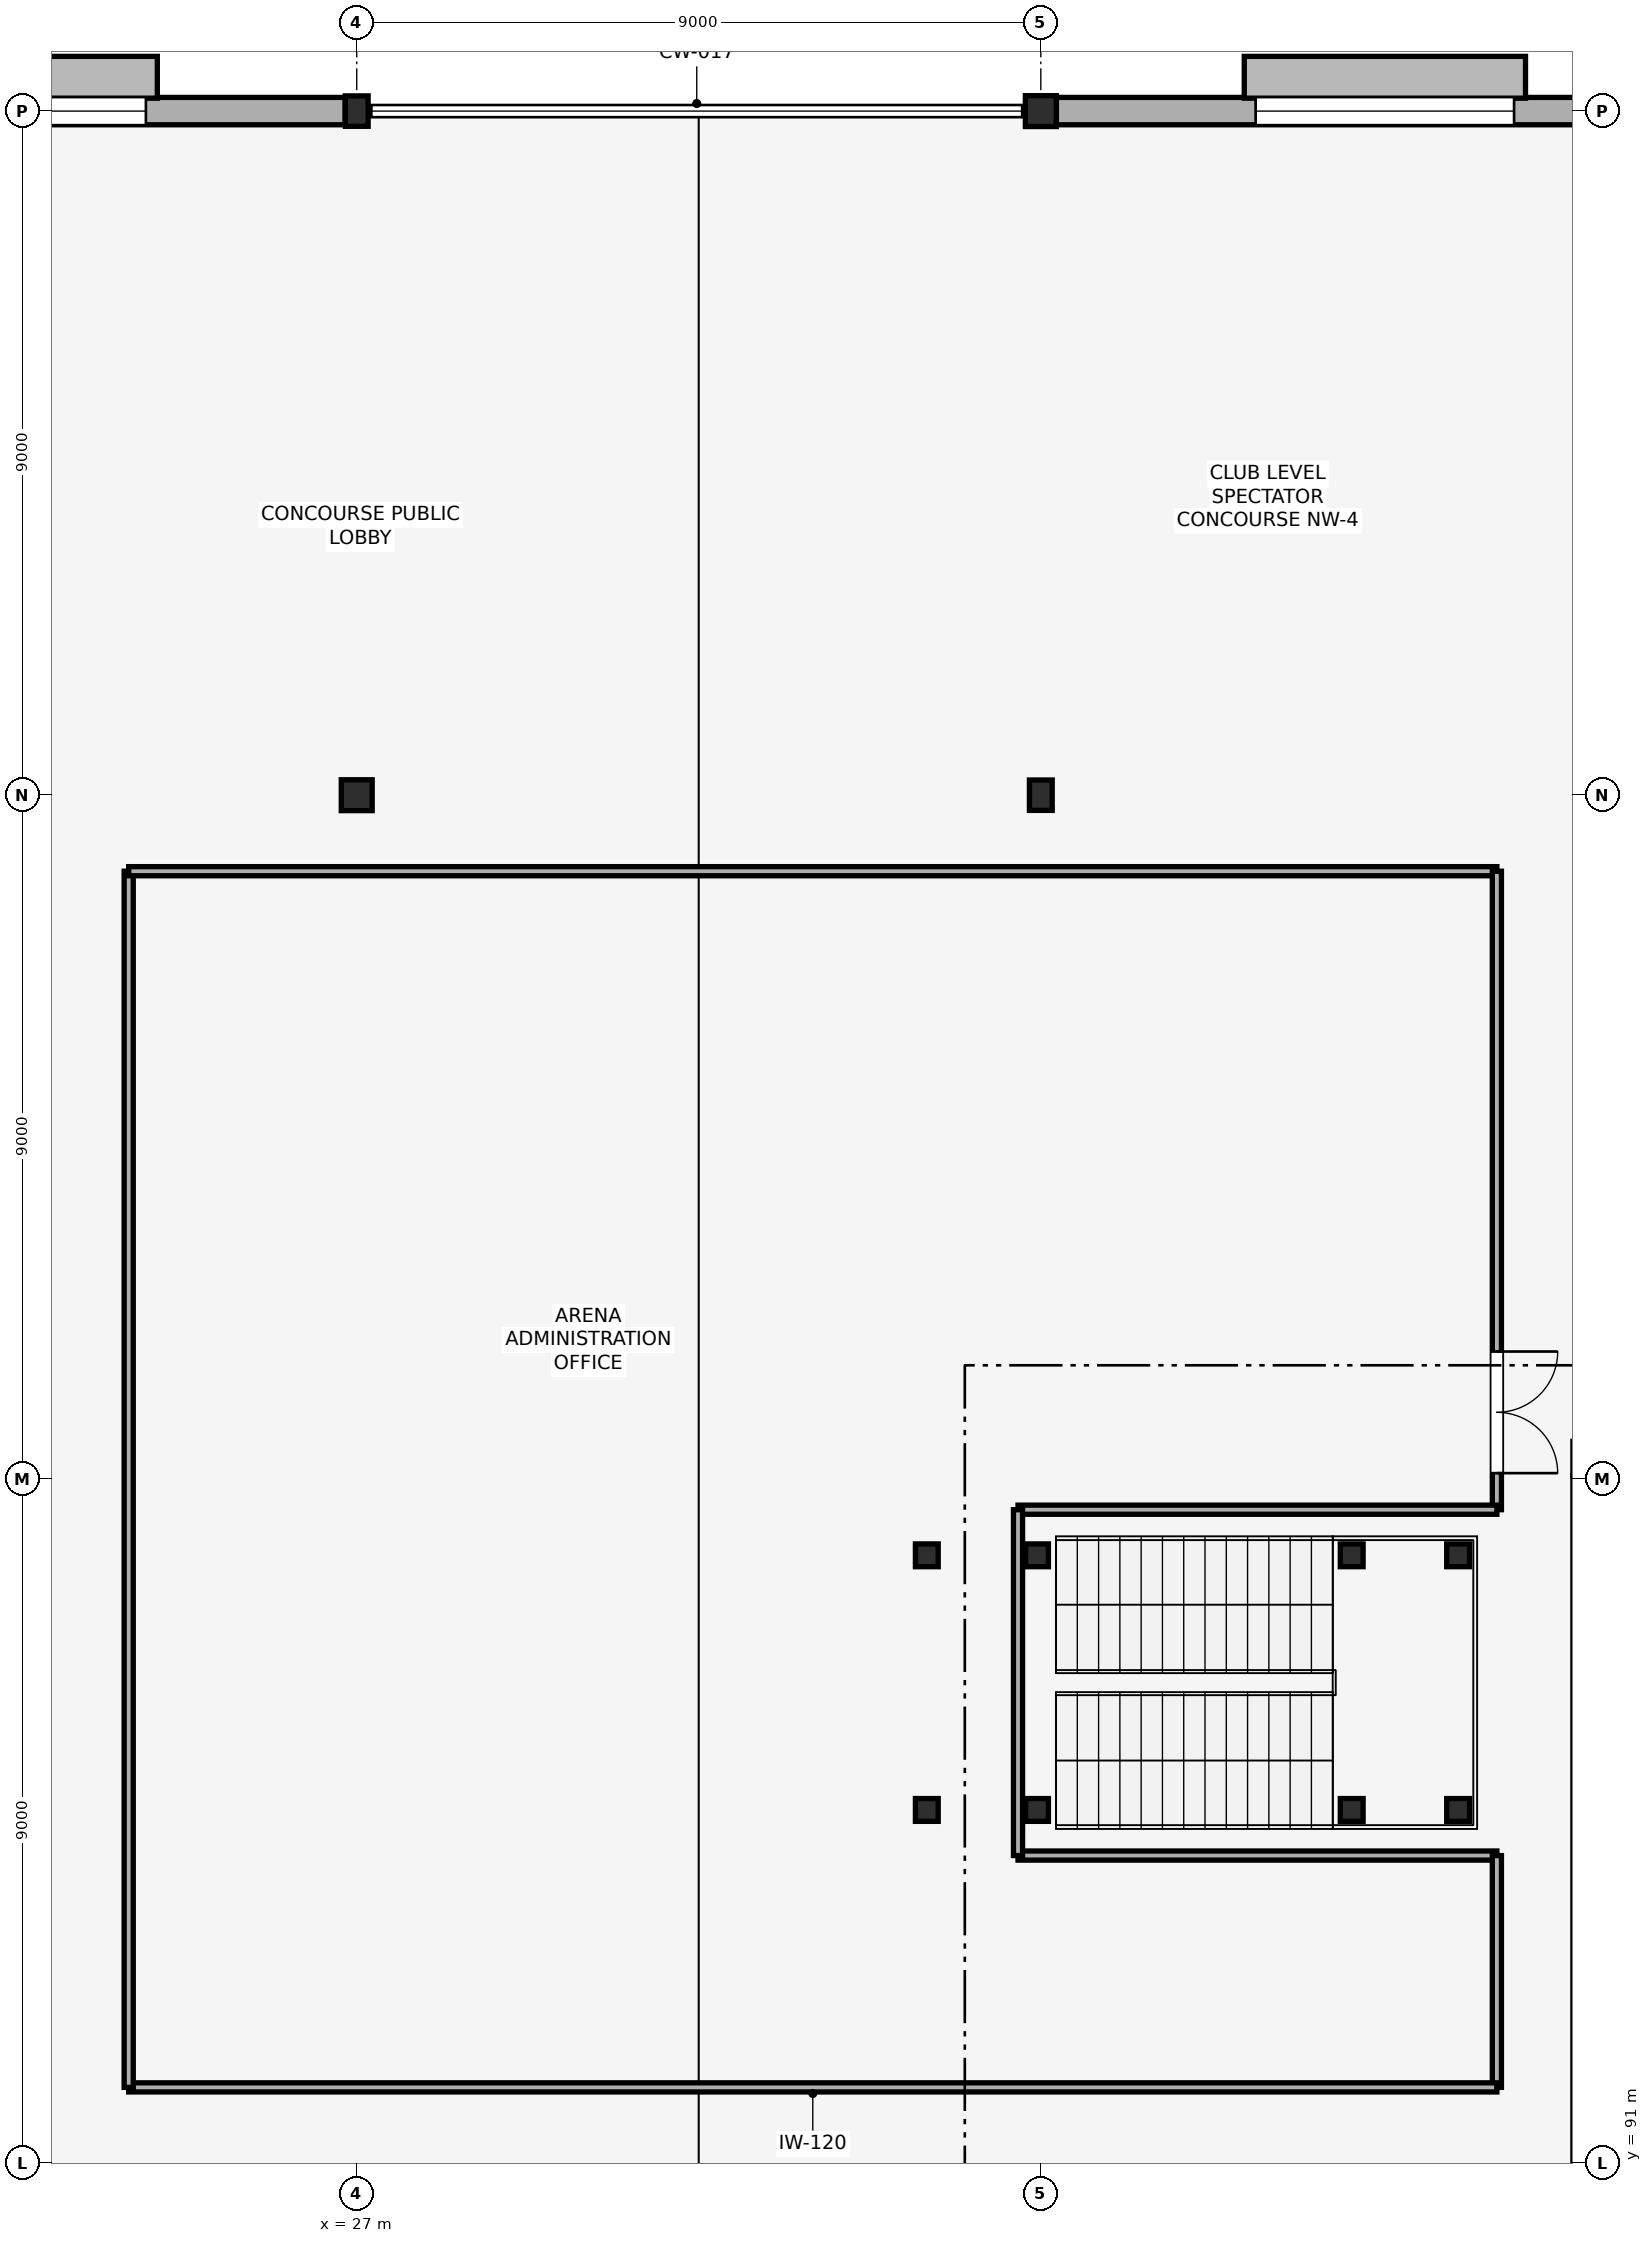
"""IFC4 building model, lengths in metres.
Left out: names, types, materials, properties, quantities, classifications, styles, units other than length and angle.
Written with IfcOpenShell. Run it as: python <this file> out.ifc"""

import sys

from ifc_helpers import new_model, si_unit, direction, frame, frame_2d, origin, origin_2d, place, context, subcontext, project, spatial, rectangle, hollow_rectangle, hollow_circle, i_section, extrude, element, fill, save


model = new_model("IFC4")
c1 = context("Model", 3, precision=1e-05, world=origin(), true_north=direction((0.0, 1.0)))
c2 = subcontext(c1, "Body", "Model", "MODEL_VIEW")
j1 = project(units=[si_unit("LENGTHUNIT", "METRE"), si_unit("PLANEANGLEUNIT", "RADIAN")], contexts=[c1])
p1 = place(None, origin())
s1 = spatial("IfcSite", under=j1, at=p1, CompositionType="ELEMENT")
p2 = place(p1, origin())
s2 = spatial("IfcBuilding", under=s1, at=p2, CompositionType="ELEMENT")
p3 = place(p2, frame((0.0, 0.0, 10.2)))
s3 = spatial("IfcBuildingStorey", under=s2, at=p3, CompositionType="ELEMENT", Elevation=10.2)
p4 = place(p3, frame((27.0, 109.0, 0.0), z_axis=(0.0, 0.0, 1.0), x_axis=(1.0, 0.0, 0.0)))
e1 = element("IfcColumn", 1, at=p4, inside=s3, PredefinedType="COLUMN", context=c2, shape_type="SweptSolid", body=[
    extrude(hollow_circle(Radius=0.203, WallThickness=0.016, at=origin_2d()), origin(), (0.0, 0.0, 1.0), 4.8),
])
for number, where, z_axis, x_axis in (
    (2, (27.0, 118.0, 0.0), (0.0, 0.0, 1.0), (1.0, 0.0, 0.0)),
    (3, (36.0, 109.0, 0.0), (0.0, 0.0, 1.0), (1.0, 0.0, 0.0)),
):
    element("IfcColumn", number, at=place(p3, frame(where, z_axis=z_axis, x_axis=x_axis)), inside=s3, PredefinedType="COLUMN", context=c2, shape_type="SweptSolid", body=[
        extrude(i_section(OverallWidth=0.3, OverallDepth=0.4, WebThickness=0.013, FlangeThickness=0.024, FilletRadius=0.027, at=origin_2d()), origin(), (0.0, 0.0, 1.0), 4.8),
    ])
p5 = place(p3, frame((36.0, 118.0, 0.0), z_axis=(0.0, 0.0, 1.0), x_axis=(1.0, 0.0, 0.0)))
e4 = element("IfcColumn", 4, at=p5, inside=s3, PredefinedType="COLUMN", context=c2, shape_type="SweptSolid", body=[
    extrude(hollow_circle(Radius=0.203, WallThickness=0.016, at=origin_2d()), origin(), (0.0, 0.0, 1.0), 4.8),
])
p6 = place(p3, frame((18.205, 118.0, 0.0), z_axis=(0.0, 0.0, 1.0), x_axis=(1.0, 0.0, 0.0)))
e5 = element("IfcWall", 5, at=p6, inside=s3, PredefinedType="STANDARD", context=c2, shape_type="SweptSolid", body=[
    extrude(rectangle(XDim=8.643, YDim=0.36, at=frame_2d((4.321, 0.0))), origin(), (0.0, 0.0, 1.0), 3.907),
])
p7 = place(p6, frame((2.621, 0.0, 0.9)))
e6 = element("IfcOpeningElement", 6, at=p7, cuts=e5, PredefinedType="OPENING", context=c2, shape_type="SweptSolid", body=[
    extrude(rectangle(XDim=3.4, YDim=2.0, at=frame_2d((1.7, 1.0))), frame((0.0, 0.19, 0.0), z_axis=(0.0, -1.0, 0.0), x_axis=(1.0, 0.0, 0.0)), (0.0, 0.0, 1.0), 0.38),
])
p8 = place(p3, frame((36.205, 118.0, 0.0), z_axis=(0.0, 0.0, 1.0), x_axis=(1.0, 0.0, 0.0)))
e7 = element("IfcWall", 7, at=p8, inside=s3, PredefinedType="STANDARD", context=c2, shape_type="SweptSolid", body=[
    extrude(rectangle(XDim=8.643, YDim=0.36, at=frame_2d((4.321, 0.0))), origin(), (0.0, 0.0, 1.0), 3.907),
])
p9 = place(p8, frame((2.621, 0.0, 0.9)))
e8 = element("IfcOpeningElement", 8, at=p9, cuts=e7, PredefinedType="OPENING", context=c2, shape_type="SweptSolid", body=[
    extrude(rectangle(XDim=3.4, YDim=2.0, at=frame_2d((1.7, 1.0))), frame((0.0, 0.19, 0.0), z_axis=(0.0, -1.0, 0.0), x_axis=(1.0, 0.0, 0.0)), (0.0, 0.0, 1.0), 0.38),
])
for number, where, z_axis, x_axis in (
    (9, (34.5, 95.65, 0.0), (0.0, 0.0, 1.0), (1.0, 0.0, 0.0)),
    (10, (34.5, 99.0, 0.0), (0.0, 0.0, 1.0), (1.0, 0.0, 0.0)),
    (11, (35.95, 95.65, 0.0), (0.0, 0.0, 1.0), (1.0, 0.0, 0.0)),
    (12, (35.95, 99.0, 0.0), (0.0, 0.0, 1.0), (1.0, 0.0, 0.0)),
):
    element("IfcColumn", number, at=place(p3, frame(where, z_axis=z_axis, x_axis=x_axis)), inside=s3, PredefinedType="COLUMN", context=c2, shape_type="SweptSolid", body=[
        extrude(hollow_rectangle(XDim=0.3, YDim=0.3, WallThickness=0.012, at=origin_2d()), origin(), (0.0, 0.0, 1.0), 4.52),
    ])
for number, where, z_axis, x_axis in (
    (13, (40.09, 95.65, 0.0), (0.0, 0.0, 1.0), (1.0, 0.0, 0.0)),
    (14, (40.09, 99.0, 0.0), (0.0, 0.0, 1.0), (1.0, 0.0, 0.0)),
    (15, (41.49, 95.65, 0.0), (0.0, 0.0, 1.0), (1.0, 0.0, 0.0)),
    (16, (41.49, 99.0, 0.0), (0.0, 0.0, 1.0), (1.0, 0.0, 0.0)),
):
    element("IfcColumn", number, at=place(p3, frame(where, z_axis=z_axis, x_axis=x_axis)), inside=s3, PredefinedType="COLUMN", context=c2, shape_type="SweptSolid", body=[
        extrude(hollow_rectangle(XDim=0.3, YDim=0.3, WallThickness=0.012, at=origin_2d()), origin(), (0.0, 0.0, 1.0), 2.18),
    ])
p10 = place(p3, frame((35.7, 95.05, 0.0), z_axis=(0.0, 0.0, 1.0), x_axis=(1.0, 0.0, 0.0)))
e17 = element("IfcWall", 17, at=p10, inside=s3, PredefinedType="PARTITIONING", context=c2, shape_type="SweptSolid", body=[
    extrude(rectangle(XDim=6.3, YDim=0.12, at=frame_2d((3.15, 0.0))), origin(), (0.0, 0.0, 1.0), 4.52),
])
p11 = place(p3, frame((42.0, 95.05, 0.0), z_axis=(0.0, 0.0, 1.0), x_axis=(0.0, -1.0, 0.0)))
e18 = element("IfcWall", 18, at=p11, inside=s3, PredefinedType="PARTITIONING", context=c2, shape_type="SweptSolid", body=[
    extrude(rectangle(XDim=3.05, YDim=0.12, at=frame_2d((1.525, 0.0))), origin(), (0.0, 0.0, 1.0), 4.52),
])
p12 = place(p3, frame((42.0, 92.0, 0.0), z_axis=(0.0, 0.0, 1.0), x_axis=(-1.0, 0.0, 0.0)))
e19 = element("IfcWall", 19, at=p12, inside=s3, PredefinedType="PARTITIONING", context=c2, shape_type="SweptSolid", body=[
    extrude(rectangle(XDim=18.0, YDim=0.12, at=frame_2d((9.0, 0.0))), origin(), (0.0, 0.0, 1.0), 4.52),
])
p13 = place(p3, frame((24.0, 92.0, 0.0), z_axis=(0.0, 0.0, 1.0), x_axis=(0.0, 1.0, 0.0)))
e20 = element("IfcWall", 20, at=p13, inside=s3, PredefinedType="PARTITIONING", context=c2, shape_type="SweptSolid", body=[
    extrude(rectangle(XDim=16.0, YDim=0.12, at=frame_2d((8.0, 0.0))), origin(), (0.0, 0.0, 1.0), 4.52),
])
p14 = place(p3, frame((24.0, 108.0, 0.0), z_axis=(0.0, 0.0, 1.0), x_axis=(1.0, 0.0, 0.0)))
e21 = element("IfcWall", 21, at=p14, inside=s3, PredefinedType="PARTITIONING", context=c2, shape_type="SweptSolid", body=[
    extrude(rectangle(XDim=18.0, YDim=0.12, at=frame_2d((9.0, 0.0))), origin(), (0.0, 0.0, 1.0), 4.52),
])
p15 = place(p3, frame((42.0, 108.0, 0.0), z_axis=(0.0, 0.0, 1.0), x_axis=(0.0, -1.0, 0.0)))
e22 = element("IfcWall", 22, at=p15, inside=s3, PredefinedType="PARTITIONING", context=c2, shape_type="SweptSolid", body=[
    extrude(rectangle(XDim=8.4, YDim=0.12, at=frame_2d((4.2, 0.0))), origin(), (0.0, 0.0, 1.0), 4.52),
])
p16 = place(p15, frame((6.319, 0.0, 0.0)))
e23 = element("IfcOpeningElement", 23, at=p16, cuts=e22, PredefinedType="OPENING", context=c2, shape_type="SweptSolid", body=[
    extrude(rectangle(XDim=1.6, YDim=2.2, at=frame_2d((0.8, 1.1))), frame((0.0, 0.07, 0.0), z_axis=(0.0, -1.0, 0.0), x_axis=(1.0, 0.0, 0.0)), (0.0, 0.0, 1.0), 0.14),
])
p17 = place(p3, frame((42.0, 99.6, 0.0), z_axis=(0.0, 0.0, 1.0), x_axis=(-1.0, 0.0, 0.0)))
e24 = element("IfcWall", 24, at=p17, inside=s3, PredefinedType="PARTITIONING", context=c2, shape_type="SweptSolid", body=[
    extrude(rectangle(XDim=6.3, YDim=0.12, at=frame_2d((3.15, 0.0))), origin(), (0.0, 0.0, 1.0), 4.52),
])
p18 = place(p3, frame((35.7, 99.6, 0.0), z_axis=(0.0, 0.0, 1.0), x_axis=(0.0, -1.0, 0.0)))
e25 = element("IfcWall", 25, at=p18, inside=s3, PredefinedType="PARTITIONING", context=c2, shape_type="SweptSolid", body=[
    extrude(rectangle(XDim=4.55, YDim=0.12, at=frame_2d((2.275, 0.0))), origin(), (0.0, 0.0, 1.0), 4.52),
])
p19 = place(p7, origin())
e26 = element("IfcWindow", 26, at=p19, inside=s3, PartitioningType="SINGLE_PANEL", PredefinedType="WINDOW", context=c2, shape_type="SweptSolid", body=[
    extrude(rectangle(XDim=3.4, YDim=2.0, at=frame_2d((1.7, 1.0))), frame((0.0, 0.03, 0.0), z_axis=(0.0, -1.0, 0.0), x_axis=(1.0, 0.0, 0.0)), (0.0, 0.0, 1.0), 0.06),
])
fill(e6, e26)
p20 = place(p9, origin())
e27 = element("IfcWindow", 27, at=p20, inside=s3, PartitioningType="SINGLE_PANEL", PredefinedType="WINDOW", context=c2, shape_type="SweptSolid", body=[
    extrude(rectangle(XDim=3.4, YDim=2.0, at=frame_2d((1.7, 1.0))), frame((0.0, 0.03, 0.0), z_axis=(0.0, -1.0, 0.0), x_axis=(1.0, 0.0, 0.0)), (0.0, 0.0, 1.0), 0.06),
])
fill(e8, e27)
p21 = place(p16, origin())
e28 = element("IfcDoor", 28, at=p21, inside=s3, OperationType="DOUBLE_DOOR_SINGLE_SWING", PredefinedType="DOOR", context=c2, shape_type="SweptSolid", body=[
    extrude(rectangle(XDim=1.6, YDim=2.2, at=frame_2d((0.8, 1.1))), frame((0.0, 0.025, 0.0), z_axis=(0.0, -1.0, 0.0), x_axis=(1.0, 0.0, 0.0)), (0.0, 0.0, 1.0), 0.05),
])
fill(e23, e28)
save(model, sys.argv[1])
